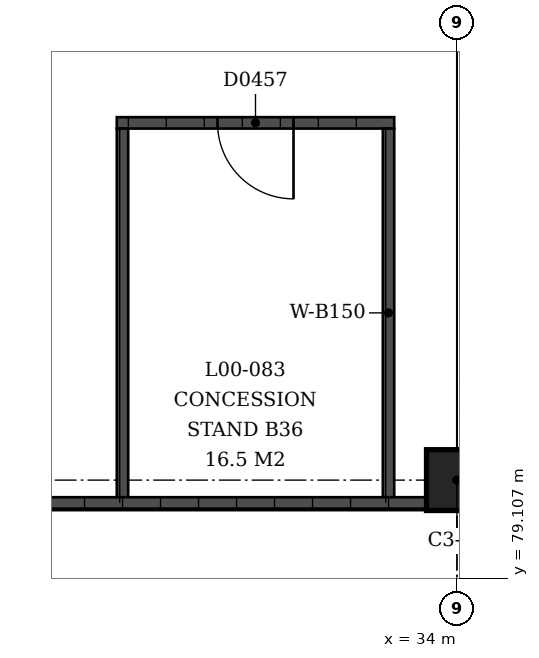
"""IFC4 building model, lengths in metres.
Left out: names, types, materials, properties, quantities, classifications, styles, units other than length and angle.
Written with IfcOpenShell. Run it as: python <this file> out.ifc"""

import sys

from ifc_helpers import new_model, si_unit, direction, frame, frame_2d, origin, origin_2d, place, context, subcontext, project, spatial, rectangle, extrude, element, fill, save


model = new_model("IFC4")
c1 = context("Model", 3, precision=1e-05, world=origin(), true_north=direction((0.0, 1.0)))
c2 = subcontext(c1, "Body", "Model", "MODEL_VIEW")
j1 = project(units=[si_unit("LENGTHUNIT", "METRE"), si_unit("PLANEANGLEUNIT", "RADIAN")], contexts=[c1])
p1 = place(None, origin())
s1 = spatial("IfcSite", under=j1, at=p1, CompositionType="ELEMENT")
p2 = place(p1, origin())
s2 = spatial("IfcBuilding", under=s1, at=p2, CompositionType="ELEMENT")
p3 = place(p2, origin())
s3 = spatial("IfcBuildingStorey", under=s2, at=p3, CompositionType="ELEMENT", Elevation=0.0)
p4 = place(p3, frame((34.0, 80.4, 0.0), z_axis=(0.0, 0.0, 1.0), x_axis=(-1.0, 0.0, 0.0)))
e1 = element("IfcColumn", 1, at=p4, inside=s3, PredefinedType="COLUMN", context=c2, shape_type="SweptSolid", body=[
    extrude(rectangle(XDim=0.8, YDim=0.8, at=origin_2d()), origin(), (0.0, 0.0, 1.0), 4.5),
])
p5 = place(p3, frame((29.525, 85.1, 0.0), z_axis=(0.0, 0.0, 1.0), x_axis=(1.0, 0.0, 0.0)))
e2 = element("IfcWall", 2, at=p5, inside=s3, PredefinedType="SOLIDWALL", context=c2, shape_type="SweptSolid", body=[
    extrude(rectangle(XDim=3.65, YDim=0.15, at=frame_2d((1.825, 0.0))), origin(), (0.0, 0.0, 1.0), 3.0),
])
p6 = place(p5, frame((1.325, 0.0, 0.0)))
e3 = element("IfcOpeningElement", 3, at=p6, cuts=e2, PredefinedType="OPENING", context=c2, shape_type="SweptSolid", body=[
    extrude(rectangle(XDim=1.0, YDim=2.1, at=frame_2d((0.5, 1.05))), frame((0.0, 0.075, 0.0), z_axis=(0.0, -1.0, 0.0), x_axis=(1.0, 0.0, 0.0)), (0.0, 0.0, 1.0), 0.15),
])
for number, where, z_axis, x_axis in (
    (4, (29.6, 80.1, 0.0), (0.0, 0.0, 1.0), (0.0, 1.0, 0.0)),
    (5, (33.1, 80.1, 0.0), (0.0, 0.0, 1.0), (0.0, 1.0, 0.0)),
):
    element("IfcWall", number, at=place(p3, frame(where, z_axis=z_axis, x_axis=x_axis)), inside=s3, PredefinedType="SOLIDWALL", context=c2, shape_type="SweptSolid", body=[
        extrude(rectangle(XDim=4.925, YDim=0.15, at=frame_2d((2.462, 0.0))), origin(), (0.0, 0.0, 1.0), 3.0),
    ])
p7 = place(p3, frame((20.9, 80.1, 0.0), z_axis=(0.0, 0.0, 1.0), x_axis=(1.0, 0.0, 0.0)))
e6 = element("IfcWall", 6, at=p7, inside=s3, PredefinedType="SOLIDWALL", context=c2, shape_type="SweptSolid", body=[
    extrude(rectangle(XDim=12.7, YDim=0.15, at=frame_2d((6.35, 0.0))), origin(), (0.0, 0.0, 1.0), 3.0),
])
p8 = place(p6, origin())
e7 = element("IfcDoor", 7, at=p8, inside=s3, OperationType="SINGLE_SWING_RIGHT", PredefinedType="DOOR", context=c2, shape_type="SweptSolid", body=[
    extrude(rectangle(XDim=1.0, YDim=2.1, at=frame_2d((0.5, 1.05))), frame((0.0, 0.025, 0.0), z_axis=(0.0, -1.0, 0.0), x_axis=(1.0, 0.0, 0.0)), (0.0, 0.0, 1.0), 0.05),
])
fill(e3, e7)
save(model, sys.argv[1])
